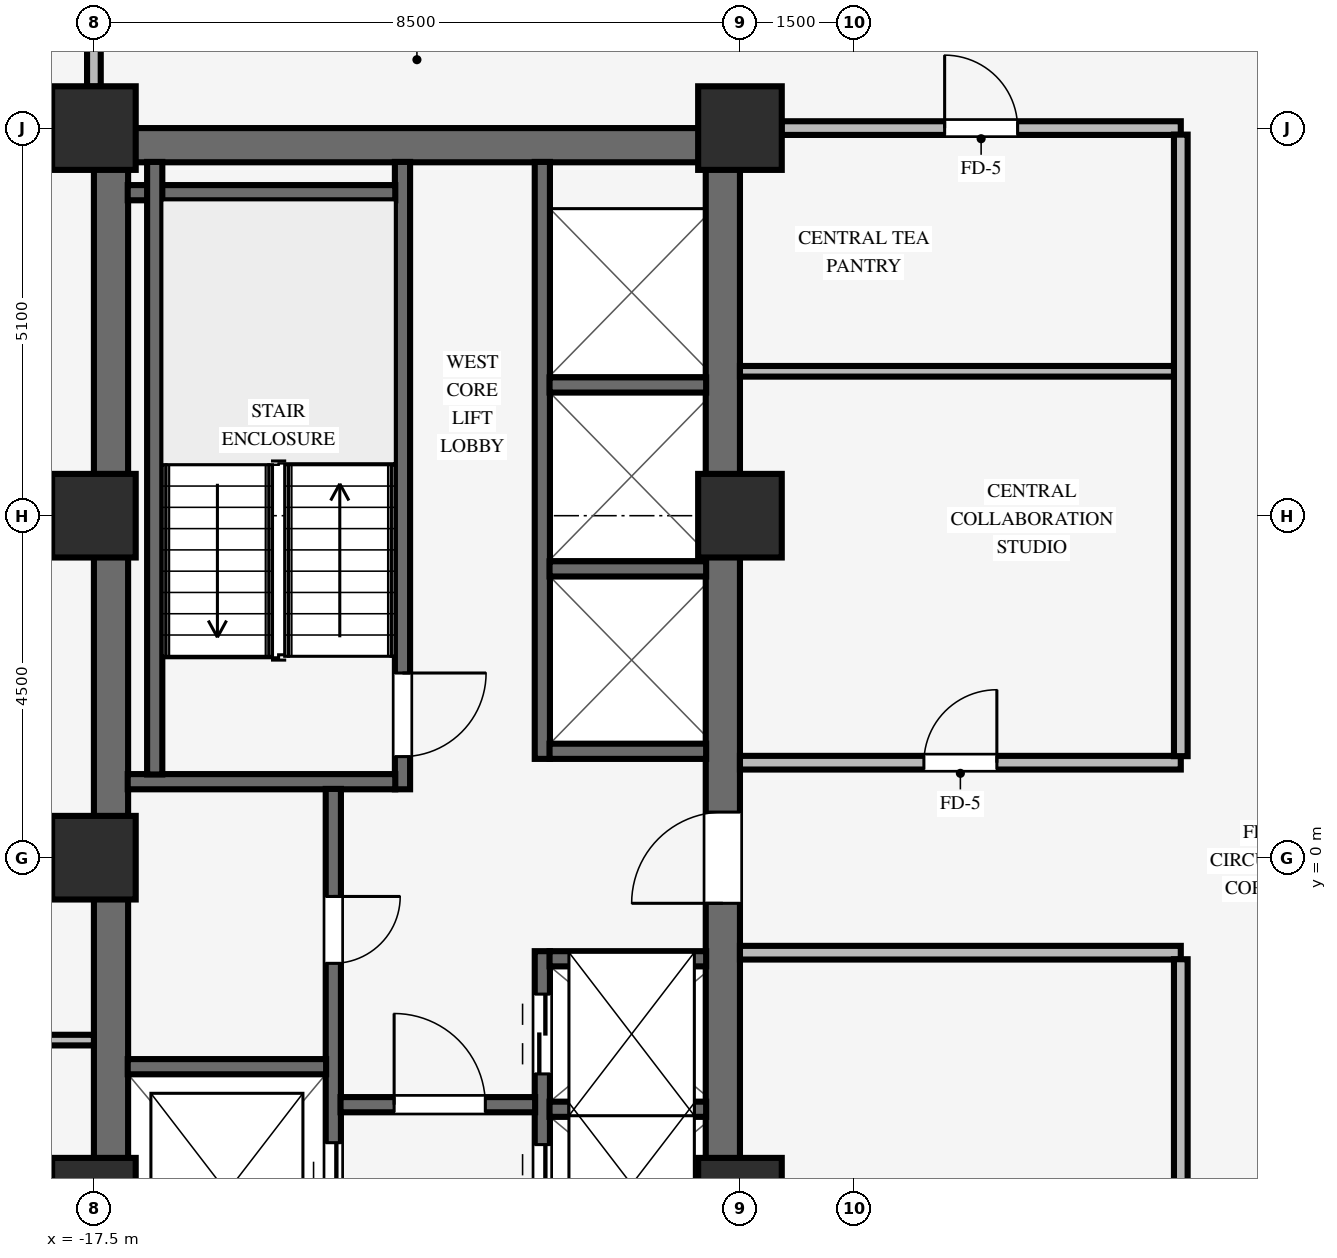
"""IFC4 building model, lengths in metres.
Left out: names, types, materials, properties, quantities, classifications, styles, units other than length and angle.
Written with IfcOpenShell. Run it as: python <this file> out.ifc"""

import sys

from ifc_helpers import new_model, si_unit, direction, frame, frame_2d, origin, origin_2d, place, context, subcontext, project, spatial, rectangle, extrude, source, transform, mapped, element, fill, save


model = new_model("IFC4")
c1 = context("Model", 3, precision=1e-05, world=origin(), true_north=direction((0.0, 1.0)))
c2 = subcontext(c1, "Body", "Model", "MODEL_VIEW")
j1 = project(units=[si_unit("LENGTHUNIT", "METRE"), si_unit("PLANEANGLEUNIT", "RADIAN")], contexts=[c1])
p1 = place(None, origin())
s1 = spatial("IfcSite", under=j1, at=p1, CompositionType="ELEMENT")
p2 = place(p1, origin())
s2 = spatial("IfcBuilding", under=s1, at=p2, CompositionType="ELEMENT")
p3 = place(p2, frame((0.0, 0.0, 89.65)))
s3 = spatial("IfcBuildingStorey", under=s2, at=p3, CompositionType="ELEMENT", Elevation=89.65)
p4 = place(p3, frame((-17.5, 9.375, 0.0), z_axis=(0.0, 0.0, 1.0), x_axis=(1.0, 0.0, 0.0)))
e1 = element("IfcWall", 1, at=p4, inside=s3, PredefinedType="SHEAR", context=c2, shape_type="SweptSolid", body=[
    extrude(rectangle(XDim=8.5, YDim=0.45, at=frame_2d((4.25, 0.0))), origin(), (0.0, 0.0, 1.0), 3.25),
])
p5 = place(p3, frame((-17.275, -9.155, 0.0), z_axis=(0.0, 0.0, 1.0), x_axis=(0.0, 1.0, 0.0)))
e2 = element("IfcWall", 2, at=p5, inside=s3, PredefinedType="SHEAR", context=c2, shape_type="SweptSolid", body=[
    extrude(rectangle(XDim=18.31, YDim=0.45, at=frame_2d((9.155, 0.0))), origin(), (0.0, 0.0, 1.0), 3.25),
])
p6 = place(p3, frame((-9.225, -9.155, 0.0), z_axis=(0.0, 0.0, 1.0), x_axis=(0.0, 1.0, 0.0)))
e3 = element("IfcWall", 3, at=p6, inside=s3, PredefinedType="SHEAR", context=c2, shape_type="SweptSolid", body=[
    extrude(rectangle(XDim=18.31, YDim=0.45, at=frame_2d((9.155, 0.0))), origin(), (0.0, 0.0, 1.0), 3.25),
])
p7 = place(p6, frame((8.555, 0.0, 0.0)))
e4 = element("IfcOpeningElement", 4, at=p7, cuts=e3, PredefinedType="OPENING", context=c2, shape_type="SweptSolid", body=[
    extrude(rectangle(XDim=1.2, YDim=2.15, at=frame_2d((0.6, 1.075))), frame((0.0, 0.235, 0.0), z_axis=(0.0, -1.0, 0.0), x_axis=(1.0, 0.0, 0.0)), (0.0, 0.0, 1.0), 0.47),
])
for number, where, z_axis, x_axis in (
    (5, (-17.5, -4.5, 0.0), (0.0, 0.0, 1.0), (1.0, 0.0, 0.0)),
    (6, (-17.5, 4.5, 0.0), (0.0, 0.0, 1.0), (1.0, 0.0, 0.0)),
    (7, (-17.5, 9.6, 0.0), (0.0, 0.0, 1.0), (1.0, 0.0, 0.0)),
    (8, (-9.0, -4.5, 0.0), (0.0, 0.0, 1.0), (1.0, 0.0, 0.0)),
    (9, (-9.0, 4.5, 0.0), (0.0, 0.0, 1.0), (1.0, 0.0, 0.0)),
    (10, (-9.0, 9.6, 0.0), (0.0, 0.0, 1.0), (1.0, 0.0, 0.0)),
    (11, (-17.5, 0.0, 0.0), (0.0, 0.0, 1.0), (1.0, 0.0, 0.0)),
):
    element("IfcColumn", number, at=place(p3, frame(where, z_axis=z_axis, x_axis=x_axis)), inside=s3, PredefinedType="COLUMN", context=c2, shape_type="SweptSolid", body=[
        extrude(rectangle(XDim=1.1, YDim=1.1, at=origin_2d()), origin(), (0.0, 0.0, 1.0), 3.25),
    ])
p8 = place(p3, frame((-13.44, 0.9, 0.0), z_axis=(0.0, 0.0, 1.0), x_axis=(0.0, 1.0, 0.0)))
e12 = element("IfcWall", 12, at=p8, inside=s3, PredefinedType="SHEAR", context=c2, shape_type="SweptSolid", body=[
    extrude(rectangle(XDim=8.255, YDim=0.2, at=frame_2d((4.127, 0.0))), origin(), (0.0, 0.0, 1.0), 3.25),
])
p9 = place(p8, frame((1.53, 0.0, 0.0), z_axis=(0.0, 0.0, 1.0), x_axis=(-1.0, 0.0, 0.0)))
e13 = element("IfcOpeningElement", 13, at=p9, cuts=e12, PredefinedType="OPENING", context=c2, shape_type="SweptSolid", body=[
    extrude(rectangle(XDim=1.1, YDim=2.15, at=frame_2d((0.55, 1.075))), frame((0.0, 0.11, 0.0), z_axis=(0.0, -1.0, 0.0), x_axis=(1.0, 0.0, 0.0)), (0.0, 0.0, 1.0), 0.22),
])
for number, where, z_axis, x_axis in (
    (14, (-17.055, 1.0, 0.0), (0.0, 0.0, 1.0), (1.0, 0.0, 0.0)),
    (15, (-17.055, 8.75, 0.0), (0.0, 0.0, 1.0), (1.0, 0.0, 0.0)),
):
    element("IfcWall", number, at=place(p3, frame(where, z_axis=z_axis, x_axis=x_axis)), inside=s3, PredefinedType="SHEAR", context=c2, shape_type="SweptSolid", body=[
        extrude(rectangle(XDim=3.52, YDim=0.2, at=frame_2d((1.76, 0.0))), origin(), (0.0, 0.0, 1.0), 3.25),
    ])
p10 = place(p3, frame((-16.7, 1.095, 0.0), z_axis=(0.0, 0.0, 1.0), x_axis=(0.0, 1.0, 0.0)))
e16 = element("IfcWall", 16, at=p10, inside=s3, PredefinedType="SHEAR", context=c2, shape_type="SweptSolid", body=[
    extrude(rectangle(XDim=8.06, YDim=0.2, at=frame_2d((4.03, 0.0))), origin(), (0.0, 0.0, 1.0), 3.25),
])
p11 = place(p3, frame((-14.35, -6.2, 0.0), z_axis=(0.0, 0.0, 1.0), x_axis=(0.0, 1.0, 0.0)))
e17 = element("IfcWall", 17, at=p11, inside=s3, PredefinedType="SHEAR", context=c2, shape_type="SweptSolid", body=[
    extrude(rectangle(XDim=7.105, YDim=0.2, at=frame_2d((3.552, 0.0))), origin(), (0.0, 0.0, 1.0), 3.25),
])
p12 = place(p11, frame((5.69, 0.0, 0.0), z_axis=(0.0, 0.0, 1.0), x_axis=(-1.0, 0.0, 0.0)))
e18 = element("IfcOpeningElement", 18, at=p12, cuts=e17, PredefinedType="OPENING", context=c2, shape_type="SweptSolid", body=[
    extrude(rectangle(XDim=0.88, YDim=2.1, at=frame_2d((0.44, 1.05))), frame((0.0, 0.11, 0.0), z_axis=(0.0, -1.0, 0.0), x_axis=(1.0, 0.0, 0.0)), (0.0, 0.0, 1.0), 0.22),
])
p13 = place(p11, frame((1.15, 0.0, 0.0)))
e19 = element("IfcOpeningElement", 19, at=p13, cuts=e17, PredefinedType="OPENING", context=c2, shape_type="SweptSolid", body=[
    extrude(rectangle(XDim=1.3, YDim=2.2, at=frame_2d((0.65, 1.1))), frame((0.0, 0.11, 0.0), z_axis=(0.0, -1.0, 0.0), x_axis=(1.0, 0.0, 0.0)), (0.0, 0.0, 1.0), 0.22),
])
p14 = place(p3, frame((-17.055, -2.75, 0.0), z_axis=(0.0, 0.0, 1.0), x_axis=(1.0, 0.0, 0.0)))
e20 = element("IfcWall", 20, at=p14, inside=s3, PredefinedType="SHEAR", context=c2, shape_type="SweptSolid", body=[
    extrude(rectangle(XDim=2.61, YDim=0.2, at=frame_2d((1.305, 0.0))), origin(), (0.0, 0.0, 1.0), 3.25),
])
p15 = place(p3, frame((-11.6, -9.155, 0.0), z_axis=(0.0, 0.0, 1.0), x_axis=(0.0, 1.0, 0.0)))
e21 = element("IfcWall", 21, at=p15, inside=s3, PredefinedType="SHEAR", context=c2, shape_type="SweptSolid", body=[
    extrude(rectangle(XDim=7.925, YDim=0.2, at=frame_2d((3.962, 0.0))), origin(), (0.0, 0.0, 1.0), 3.25),
])
p16 = place(p15, frame((0.37, 0.0, 0.0)))
e22 = element("IfcOpeningElement", 22, at=p16, cuts=e21, PredefinedType="OPENING", context=c2, shape_type="SweptSolid", body=[
    extrude(rectangle(XDim=1.05, YDim=2.15, at=frame_2d((0.525, 1.075))), frame((0.0, 0.11, 0.0), z_axis=(0.0, -1.0, 0.0), x_axis=(1.0, 0.0, 0.0)), (0.0, 0.0, 1.0), 0.22),
])
p17 = place(p15, frame((2.35, 0.0, 0.0)))
e23 = element("IfcOpeningElement", 23, at=p17, cuts=e21, PredefinedType="OPENING", context=c2, shape_type="SweptSolid", body=[
    extrude(rectangle(XDim=1.05, YDim=2.15, at=frame_2d((0.525, 1.075))), frame((0.0, 0.11, 0.0), z_axis=(0.0, -1.0, 0.0), x_axis=(1.0, 0.0, 0.0)), (0.0, 0.0, 1.0), 0.22),
])
p18 = place(p15, frame((4.33, 0.0, 0.0)))
e24 = element("IfcOpeningElement", 24, at=p18, cuts=e21, PredefinedType="OPENING", context=c2, shape_type="SweptSolid", body=[
    extrude(rectangle(XDim=1.05, YDim=2.15, at=frame_2d((0.525, 1.075))), frame((0.0, 0.11, 0.0), z_axis=(0.0, -1.0, 0.0), x_axis=(1.0, 0.0, 0.0)), (0.0, 0.0, 1.0), 0.22),
])
p19 = place(p15, frame((6.31, 0.0, 0.0)))
e25 = element("IfcOpeningElement", 25, at=p19, cuts=e21, PredefinedType="OPENING", context=c2, shape_type="SweptSolid", body=[
    extrude(rectangle(XDim=1.05, YDim=2.15, at=frame_2d((0.525, 1.075))), frame((0.0, 0.11, 0.0), z_axis=(0.0, -1.0, 0.0), x_axis=(1.0, 0.0, 0.0)), (0.0, 0.0, 1.0), 0.22),
])
p20 = place(p3, frame((-14.255, -3.25, 0.0), z_axis=(0.0, 0.0, 1.0), x_axis=(1.0, 0.0, 0.0)))
e26 = element("IfcWall", 26, at=p20, inside=s3, PredefinedType="SHEAR", context=c2, shape_type="SweptSolid", body=[
    extrude(rectangle(XDim=2.56, YDim=0.2, at=frame_2d((1.28, 0.0))), origin(), (0.0, 0.0, 1.0), 3.25),
])
p21 = place(p20, frame((0.705, 0.0, 0.0)))
e27 = element("IfcOpeningElement", 27, at=p21, cuts=e26, PredefinedType="OPENING", context=c2, shape_type="SweptSolid", body=[
    extrude(rectangle(XDim=1.2, YDim=2.15, at=frame_2d((0.6, 1.075))), frame((0.0, 0.11, 0.0), z_axis=(0.0, -1.0, 0.0), x_axis=(1.0, 0.0, 0.0)), (0.0, 0.0, 1.0), 0.22),
])
for number, where, z_axis, x_axis in (
    (28, (-11.505, -3.31, 0.0), (0.0, 0.0, 1.0), (1.0, 0.0, 0.0)),
    (29, (-11.505, -1.33, 0.0), (0.0, 0.0, 1.0), (1.0, 0.0, 0.0)),
):
    element("IfcWall", number, at=place(p3, frame(where, z_axis=z_axis, x_axis=x_axis)), inside=s3, PredefinedType="SHEAR", context=c2, shape_type="SweptSolid", body=[
        extrude(rectangle(XDim=2.06, YDim=0.2, at=frame_2d((1.03, 0.0))), origin(), (0.0, 0.0, 1.0), 3.25),
    ])
p22 = place(p3, frame((-11.6, 1.3, 0.0), z_axis=(0.0, 0.0, 1.0), x_axis=(0.0, 1.0, 0.0)))
e30 = element("IfcWall", 30, at=p22, inside=s3, PredefinedType="SHEAR", context=c2, shape_type="SweptSolid", body=[
    extrude(rectangle(XDim=7.855, YDim=0.2, at=frame_2d((3.927, 0.0))), origin(), (0.0, 0.0, 1.0), 3.25),
])
for number, where, z_axis, x_axis in (
    (31, (-11.505, 1.4, 0.0), (0.0, 0.0, 1.0), (1.0, 0.0, 0.0)),
    (32, (-11.505, 3.8, 0.0), (0.0, 0.0, 1.0), (1.0, 0.0, 0.0)),
    (33, (-11.505, 6.22, 0.0), (0.0, 0.0, 1.0), (1.0, 0.0, 0.0)),
):
    element("IfcWall", number, at=place(p3, frame(where, z_axis=z_axis, x_axis=x_axis)), inside=s3, PredefinedType="SHEAR", context=c2, shape_type="SweptSolid", body=[
        extrude(rectangle(XDim=2.06, YDim=0.2, at=frame_2d((1.03, 0.0))), origin(), (0.0, 0.0, 1.0), 3.25),
    ])
p23 = place(p3, frame((-23.68, -2.4, 0.0), z_axis=(0.0, 0.0, 1.0), x_axis=(1.0, 0.0, 0.0)))
e34 = element("IfcWall", 34, at=p23, inside=s3, PredefinedType="PARTITIONING", context=c2, shape_type="SweptSolid", body=[
    extrude(rectangle(XDim=6.18, YDim=0.14, at=frame_2d((3.09, 0.0))), origin(), (0.0, 0.0, 1.0), 3.24),
])
p24 = place(p3, frame((-9.0, -1.25, 0.0), z_axis=(0.0, 0.0, 1.0), x_axis=(1.0, 0.0, 0.0)))
e35 = element("IfcWall", 35, at=p24, inside=s3, PredefinedType="PARTITIONING", context=c2, shape_type="SweptSolid", body=[
    extrude(rectangle(XDim=5.8, YDim=0.18, at=frame_2d((2.9, 0.0))), origin(), (0.0, 0.0, 1.0), 3.24),
])
p25 = place(p3, frame((-9.0, 1.25, 0.0), z_axis=(0.0, 0.0, 1.0), x_axis=(1.0, 0.0, 0.0)))
e36 = element("IfcWall", 36, at=p25, inside=s3, PredefinedType="PARTITIONING", context=c2, shape_type="SweptSolid", body=[
    extrude(rectangle(XDim=5.8, YDim=0.18, at=frame_2d((2.9, 0.0))), origin(), (0.0, 0.0, 1.0), 3.24),
])
p26 = place(p25, frame((2.42, 0.0, 0.0)))
e37 = element("IfcOpeningElement", 37, at=p26, cuts=e36, PredefinedType="OPENING", context=c2, shape_type="SweptSolid", body=[
    extrude(rectangle(XDim=0.96, YDim=2.1, at=frame_2d((0.48, 1.05))), frame((0.0, 0.1, 0.0), z_axis=(0.0, -1.0, 0.0), x_axis=(1.0, 0.0, 0.0)), (0.0, 0.0, 1.0), 0.2),
])
p27 = place(p3, frame((-9.0, 6.4, 0.0), z_axis=(0.0, 0.0, 1.0), x_axis=(1.0, 0.0, 0.0)))
e38 = element("IfcWall", 38, at=p27, inside=s3, PredefinedType="PARTITIONING", context=c2, shape_type="SweptSolid", body=[
    extrude(rectangle(XDim=5.714, YDim=0.14, at=frame_2d((2.857, 0.0))), origin(), (0.0, 0.0, 1.0), 3.24),
])
p28 = place(p3, frame((-8.454, 9.6, 0.0), z_axis=(0.0, 0.0, 1.0), x_axis=(1.0, 0.0, 0.0)))
e39 = element("IfcWall", 39, at=p28, inside=s3, PredefinedType="PARTITIONING", context=c2, shape_type="SweptSolid", body=[
    extrude(rectangle(XDim=5.254, YDim=0.18, at=frame_2d((2.627, 0.0))), origin(), (0.0, 0.0, 1.0), 2.285),
])
p29 = place(p28, frame((2.147, 0.0, 0.0)))
e40 = element("IfcOpeningElement", 40, at=p29, cuts=e39, PredefinedType="OPENING", context=c2, shape_type="SweptSolid", body=[
    extrude(rectangle(XDim=0.96, YDim=2.1, at=frame_2d((0.48, 1.05))), frame((0.0, 0.1, 0.0), z_axis=(0.0, -1.0, 0.0), x_axis=(1.0, 0.0, 0.0)), (0.0, 0.0, 1.0), 0.2),
])
p30 = place(p3, frame((-17.5, 10.146, 0.0), z_axis=(0.0, 0.0, 1.0), x_axis=(0.0, 1.0, 0.0)))
e41 = element("IfcWall", 41, at=p30, inside=s3, PredefinedType="PARTITIONING", context=c2, shape_type="SweptSolid", body=[
    extrude(rectangle(XDim=0.968, YDim=0.18, at=frame_2d((0.484, 0.0))), origin(), (0.0, 0.0, 1.0), 2.335),
])
p31 = place(p3, frame((-3.2, -9.514, 0.0), z_axis=(0.0, 0.0, 1.0), x_axis=(0.0, 1.0, 0.0)))
e42 = element("IfcWall", 42, at=p31, inside=s3, PredefinedType="PARTITIONING", context=c2, shape_type="SweptSolid", body=[
    extrude(rectangle(XDim=8.178, YDim=0.18, at=frame_2d((4.089, 0.0))), origin(), (0.0, 0.0, 1.0), 3.24),
])
p32 = place(p31, frame((3.609, 0.0, 0.0)))
e43 = element("IfcOpeningElement", 43, at=p32, cuts=e42, PredefinedType="OPENING", context=c2, shape_type="SweptSolid", body=[
    extrude(rectangle(XDim=0.96, YDim=2.1, at=frame_2d((0.48, 1.05))), frame((0.0, 0.1, 0.0), z_axis=(0.0, -1.0, 0.0), x_axis=(1.0, 0.0, 0.0)), (0.0, 0.0, 1.0), 0.2),
])
p33 = place(p3, frame((-3.2, 1.336, 0.0), z_axis=(0.0, 0.0, 1.0), x_axis=(0.0, 1.0, 0.0)))
e44 = element("IfcWall", 44, at=p33, inside=s3, PredefinedType="PARTITIONING", context=c2, shape_type="SweptSolid", body=[
    extrude(rectangle(XDim=8.178, YDim=0.18, at=frame_2d((4.089, 0.0))), origin(), (0.0, 0.0, 1.0), 3.24),
])
m1 = source(origin(), c2, "Body", "SweptSolid", [
    extrude(rectangle(XDim=1.1, YDim=2.15, at=frame_2d((0.55, 1.075))), frame((0.0, 0.025, 0.0), z_axis=(0.0, -1.0, 0.0), x_axis=(1.0, 0.0, 0.0)), (0.0, 0.0, 1.0), 0.05),
])
p34 = place(p9, origin())
e45 = element("IfcDoor", 45, at=p34, inside=s3, OperationType="SINGLE_SWING_LEFT", PredefinedType="DOOR", context=c2, shape_type="MappedRepresentation", body=[
    mapped(m1, transform((0.0, 0.0, 0.0), scale=1.0)),
])
fill(e13, e45)
m2 = source(origin(), c2, "Body", "SweptSolid", [
    extrude(rectangle(XDim=0.88, YDim=2.1, at=frame_2d((0.44, 1.05))), frame((0.0, 0.025, 0.0), z_axis=(0.0, -1.0, 0.0), x_axis=(1.0, 0.0, 0.0)), (0.0, 0.0, 1.0), 0.05),
])
p35 = place(p12, origin())
e46 = element("IfcDoor", 46, at=p35, inside=s3, OperationType="SINGLE_SWING_LEFT", PredefinedType="DOOR", context=c2, shape_type="MappedRepresentation", body=[
    mapped(m2, transform((0.0, 0.0, 0.0), scale=1.0)),
])
fill(e18, e46)
m3 = source(origin(), c2, "Body", "SweptSolid", [
    extrude(rectangle(XDim=1.2, YDim=2.15, at=frame_2d((0.6, 1.075))), frame((0.0, 0.025, 0.0), z_axis=(0.0, -1.0, 0.0), x_axis=(1.0, 0.0, 0.0)), (0.0, 0.0, 1.0), 0.05),
])
p36 = place(p21, origin())
e47 = element("IfcDoor", 47, at=p36, inside=s3, OperationType="SINGLE_SWING_LEFT", PredefinedType="DOOR", context=c2, shape_type="MappedRepresentation", body=[
    mapped(m3, transform((0.0, 0.0, 0.0), scale=1.0)),
])
fill(e27, e47)
p37 = place(p7, origin())
e48 = element("IfcDoor", 48, at=p37, inside=s3, OperationType="SINGLE_SWING_LEFT", PredefinedType="DOOR", context=c2, shape_type="MappedRepresentation", body=[
    mapped(m3, transform((0.0, 0.0, 0.0), scale=1.0)),
])
fill(e4, e48)
m4 = source(origin(), c2, "Body", "SweptSolid", [
    extrude(rectangle(XDim=1.3, YDim=2.2, at=frame_2d((0.65, 1.1))), frame((0.0, 0.025, 0.0), z_axis=(0.0, -1.0, 0.0), x_axis=(1.0, 0.0, 0.0)), (0.0, 0.0, 1.0), 0.05),
])
p38 = place(p13, origin())
e49 = element("IfcDoor", 49, at=p38, inside=s3, OperationType="DOUBLE_DOOR_SLIDING", PredefinedType="DOOR", context=c2, shape_type="MappedRepresentation", body=[
    mapped(m4, transform((0.0, 0.0, 0.0), scale=1.0)),
])
fill(e19, e49)
m5 = source(origin(), c2, "Body", "SweptSolid", [
    extrude(rectangle(XDim=1.05, YDim=2.15, at=frame_2d((0.525, 1.075))), frame((0.0, 0.025, 0.0), z_axis=(0.0, -1.0, 0.0), x_axis=(1.0, 0.0, 0.0)), (0.0, 0.0, 1.0), 0.05),
])
p39 = place(p18, origin())
e50 = element("IfcDoor", 50, at=p39, inside=s3, OperationType="DOUBLE_DOOR_SLIDING", PredefinedType="DOOR", context=c2, shape_type="MappedRepresentation", body=[
    mapped(m5, transform((0.0, 0.0, 0.0), scale=1.0)),
])
fill(e24, e50)
p40 = place(p19, origin())
e51 = element("IfcDoor", 51, at=p40, inside=s3, OperationType="DOUBLE_DOOR_SLIDING", PredefinedType="DOOR", context=c2, shape_type="MappedRepresentation", body=[
    mapped(m5, transform((0.0, 0.0, 0.0), scale=1.0)),
])
fill(e25, e51)
m6 = source(origin(), c2, "Body", "SweptSolid", [
    extrude(rectangle(XDim=0.96, YDim=2.1, at=frame_2d((0.48, 1.05))), frame((0.0, 0.025, 0.0), z_axis=(0.0, -1.0, 0.0), x_axis=(1.0, 0.0, 0.0)), (0.0, 0.0, 1.0), 0.05),
])
p41 = place(p26, origin())
e52 = element("IfcDoor", 52, at=p41, inside=s3, OperationType="SINGLE_SWING_RIGHT", PredefinedType="DOOR", context=c2, shape_type="MappedRepresentation", body=[
    mapped(m6, transform((0.0, 0.0, 0.0), scale=1.0)),
])
fill(e37, e52)
p42 = place(p29, origin())
e53 = element("IfcDoor", 53, at=p42, inside=s3, OperationType="SINGLE_SWING_LEFT", PredefinedType="DOOR", context=c2, shape_type="MappedRepresentation", body=[
    mapped(m6, transform((0.0, 0.0, 0.0), scale=1.0)),
])
fill(e40, e53)
save(model, sys.argv[1])
